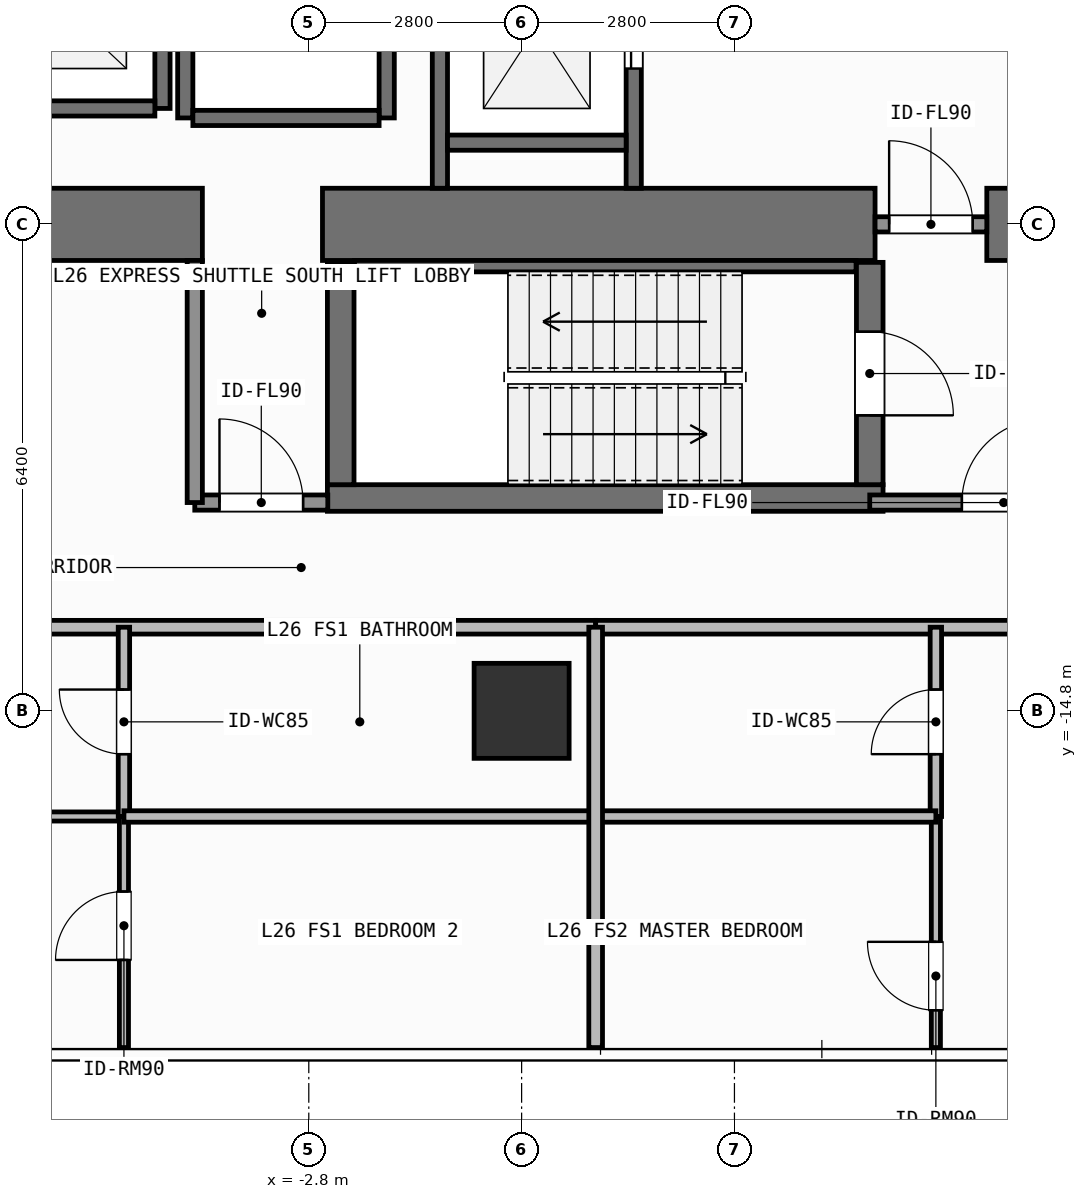
"""IFC4 building model, lengths in metres.
Left out: names, types, materials, properties, quantities, classifications, styles, units other than length and angle.
Written with IfcOpenShell. Run it as: python <this file> out.ifc"""

import sys

from ifc_helpers import new_model, si_unit, direction, frame, frame_2d, origin, origin_2d, place, context, subcontext, project, spatial, rectangle, extrude, element, fill, save


model = new_model("IFC4")
c1 = context("Model", 3, precision=1e-05, world=origin(), true_north=direction((0.0, 1.0)))
c2 = subcontext(c1, "Body", "Model", "MODEL_VIEW")
j1 = project(units=[si_unit("LENGTHUNIT", "METRE"), si_unit("PLANEANGLEUNIT", "RADIAN")], contexts=[c1])
p1 = place(None, origin())
s1 = spatial("IfcSite", under=j1, at=p1, CompositionType="ELEMENT")
p2 = place(p1, origin())
s2 = spatial("IfcBuilding", under=s1, at=p2, CompositionType="ELEMENT")
p3 = place(p2, frame((0.0, 0.0, 104.7)))
s3 = spatial("IfcBuildingStorey", under=s2, at=p3, CompositionType="ELEMENT", Elevation=104.7)
p4 = place(p3, frame((-7.55, -8.4, 0.0), z_axis=(0.0, 0.0, 1.0), x_axis=(1.0, 0.0, 0.0)))
e1 = element("IfcWall", 1, at=p4, inside=s3, PredefinedType="SHEAR", context=c2, shape_type="SweptSolid", body=[
    extrude(rectangle(XDim=3.35, YDim=0.95, at=frame_2d((1.675, 0.0))), origin(), (0.0, 0.0, 1.0), 3.9),
])
p5 = place(p3, frame((-2.62, -8.4, 0.0), z_axis=(0.0, 0.0, 1.0), x_axis=(1.0, 0.0, 0.0)))
e2 = element("IfcWall", 2, at=p5, inside=s3, PredefinedType="SHEAR", context=c2, shape_type="SweptSolid", body=[
    extrude(rectangle(XDim=7.27, YDim=0.95, at=frame_2d((3.635, 0.0))), origin(), (0.0, 0.0, 1.0), 3.9),
])
p6 = place(p3, frame((6.12, -8.4, 0.0), z_axis=(0.0, 0.0, 1.0), x_axis=(1.0, 0.0, 0.0)))
e3 = element("IfcWall", 3, at=p6, inside=s3, PredefinedType="SHEAR", context=c2, shape_type="SweptSolid", body=[
    extrude(rectangle(XDim=2.755, YDim=0.95, at=frame_2d((1.377, 0.0))), origin(), (0.0, 0.0, 1.0), 3.9),
])
p7 = place(p3, frame((-2.555, -12.0, 0.0), z_axis=(0.0, 0.0, 1.0), x_axis=(1.0, 0.0, 0.0)))
e4 = element("IfcWall", 4, at=p7, inside=s3, PredefinedType="SHEAR", context=c2, shape_type="SweptSolid", body=[
    extrude(rectangle(XDim=7.31, YDim=0.35, at=frame_2d((3.655, 0.0))), origin(), (0.0, 0.0, 1.0), 3.9),
])
p8 = place(p3, frame((-2.2, -8.95, 0.0), z_axis=(0.0, 0.0, 1.0), x_axis=(1.0, 0.0, 0.0)))
e5 = element("IfcWall", 5, at=p8, inside=s3, PredefinedType="SHEAR", context=c2, shape_type="SweptSolid", body=[
    extrude(rectangle(XDim=6.6, YDim=0.15, at=frame_2d((3.3, 0.0))), origin(), (0.0, 0.0, 1.0), 3.9),
])
p9 = place(p3, frame((-2.38, -11.825, 0.0), z_axis=(0.0, 0.0, 1.0), x_axis=(0.0, 1.0, 0.0)))
e6 = element("IfcWall", 6, at=p9, inside=s3, PredefinedType="SHEAR", context=c2, shape_type="SweptSolid", body=[
    extrude(rectangle(XDim=2.925, YDim=0.35, at=frame_2d((1.462, 0.0))), origin(), (0.0, 0.0, 1.0), 3.9),
])
p10 = place(p3, frame((4.58, -8.9, 0.0), z_axis=(0.0, 0.0, 1.0), x_axis=(0.0, -1.0, 0.0)))
e7 = element("IfcWall", 7, at=p10, inside=s3, PredefinedType="SHEAR", context=c2, shape_type="SweptSolid", body=[
    extrude(rectangle(XDim=2.925, YDim=0.35, at=frame_2d((1.462, 0.0))), origin(), (0.0, 0.0, 1.0), 3.9),
])
p11 = place(p10, frame((0.913, 0.0, 0.0)))
e8 = element("IfcOpeningElement", 8, at=p11, cuts=e7, PredefinedType="OPENING", context=c2, shape_type="SweptSolid", body=[
    extrude(rectangle(XDim=1.1, YDim=2.15, at=frame_2d((0.55, 1.075))), frame((0.0, 0.185, 0.0), z_axis=(0.0, -1.0, 0.0), x_axis=(1.0, 0.0, 0.0)), (0.0, 0.0, 1.0), 0.37),
])
p12 = place(p3, frame((0.0, -14.8, 0.0), z_axis=(0.0, 0.0, 1.0), x_axis=(1.0, 0.0, 0.0)))
e9 = element("IfcColumn", 9, at=p12, inside=s3, PredefinedType="COLUMN", context=c2, shape_type="SweptSolid", body=[
    extrude(rectangle(XDim=1.25, YDim=1.25, at=origin_2d()), origin(), (0.0, 0.0, 1.0), 3.9),
])
p13 = place(p3, frame((-4.725, -6.875, 0.0), z_axis=(0.0, 0.0, 1.0), x_axis=(0.0, 1.0, 0.0)))
e10 = element("IfcWall", 10, at=p13, inside=s3, PredefinedType="SHEAR", context=c2, shape_type="SweptSolid", body=[
    extrude(rectangle(XDim=2.55, YDim=0.2, at=frame_2d((1.275, 0.0))), origin(), (0.0, 0.0, 1.0), 3.62),
])
p14 = place(p3, frame((-7.175, -6.875, 0.0), z_axis=(0.0, 0.0, 1.0), x_axis=(1.0, 0.0, 0.0)))
e11 = element("IfcWall", 11, at=p14, inside=s3, PredefinedType="SHEAR", context=c2, shape_type="SweptSolid", body=[
    extrude(rectangle(XDim=2.35, YDim=0.2, at=frame_2d((1.175, 0.0))), origin(), (0.0, 0.0, 1.0), 3.62),
])
for number, where, z_axis, x_axis in (
    (12, (-4.425, -7.0, 0.0), (0.0, 0.0, 1.0), (0.0, 1.0, 0.0)),
    (13, (-1.775, -7.0, 0.0), (0.0, 0.0, 1.0), (0.0, 1.0, 0.0)),
):
    element("IfcWall", number, at=place(p3, frame(where, z_axis=z_axis, x_axis=x_axis)), inside=s3, PredefinedType="SHEAR", context=c2, shape_type="SweptSolid", body=[
        extrude(rectangle(XDim=2.8, YDim=0.2, at=frame_2d((1.4, 0.0))), origin(), (0.0, 0.0, 1.0), 3.62),
    ])
p15 = place(p3, frame((-4.325, -7.0, 0.0), z_axis=(0.0, 0.0, 1.0), x_axis=(1.0, 0.0, 0.0)))
e14 = element("IfcWall", 14, at=p15, inside=s3, PredefinedType="SHEAR", context=c2, shape_type="SweptSolid", body=[
    extrude(rectangle(XDim=2.45, YDim=0.2, at=frame_2d((1.225, 0.0))), origin(), (0.0, 0.0, 1.0), 3.62),
])
p16 = place(p3, frame((-1.075, -7.925, 0.0), z_axis=(0.0, 0.0, 1.0), x_axis=(0.0, 1.0, 0.0)))
e15 = element("IfcWall", 15, at=p16, inside=s3, PredefinedType="SHEAR", context=c2, shape_type="SweptSolid", body=[
    extrude(rectangle(XDim=3.65, YDim=0.2, at=frame_2d((1.825, 0.0))), origin(), (0.0, 0.0, 1.0), 3.62),
])
p17 = place(p3, frame((1.475, -7.925, 0.0), z_axis=(0.0, 0.0, 1.0), x_axis=(0.0, 1.0, 0.0)))
e16 = element("IfcWall", 16, at=p17, inside=s3, PredefinedType="SHEAR", context=c2, shape_type="SweptSolid", body=[
    extrude(rectangle(XDim=3.65, YDim=0.2, at=frame_2d((1.825, 0.0))), origin(), (0.0, 0.0, 1.0), 3.62),
])
p18 = place(p17, frame((1.575, 0.0, 0.0)))
e17 = element("IfcOpeningElement", 17, at=p18, cuts=e16, PredefinedType="OPENING", context=c2, shape_type="SweptSolid", body=[
    extrude(rectangle(XDim=1.1, YDim=2.2, at=frame_2d((0.55, 1.1))), frame((0.0, 0.11, 0.0), z_axis=(0.0, -1.0, 0.0), x_axis=(1.0, 0.0, 0.0)), (0.0, 0.0, 1.0), 0.22),
])
p19 = place(p3, frame((-0.975, -7.325, 0.0), z_axis=(0.0, 0.0, 1.0), x_axis=(1.0, 0.0, 0.0)))
e18 = element("IfcWall", 18, at=p19, inside=s3, PredefinedType="SHEAR", context=c2, shape_type="SweptSolid", body=[
    extrude(rectangle(XDim=2.35, YDim=0.2, at=frame_2d((1.175, 0.0))), origin(), (0.0, 0.0, 1.0), 3.62),
])
p20 = place(p3, frame((4.58, -12.06, 0.0), z_axis=(0.0, 0.0, 1.0), x_axis=(1.0, 0.0, 0.0)))
e19 = element("IfcWall", 19, at=p20, inside=s3, PredefinedType="SOLIDWALL", context=c2, shape_type="SweptSolid", body=[
    extrude(rectangle(XDim=3.7, YDim=0.2, at=frame_2d((1.85, 0.0))), origin(), (0.0, 0.0, 1.0), 3.62),
])
p21 = place(p20, frame((1.212, 0.0, 0.0)))
e20 = element("IfcOpeningElement", 20, at=p21, cuts=e19, PredefinedType="OPENING", context=c2, shape_type="SweptSolid", body=[
    extrude(rectangle(XDim=1.1, YDim=2.15, at=frame_2d((0.55, 1.075))), frame((0.0, 0.11, 0.0), z_axis=(0.0, -1.0, 0.0), x_axis=(1.0, 0.0, 0.0)), (0.0, 0.0, 1.0), 0.22),
])
p22 = place(p3, frame((4.65, -8.4, 0.0), z_axis=(0.0, 0.0, 1.0), x_axis=(1.0, 0.0, 0.0)))
e21 = element("IfcWall", 21, at=p22, inside=s3, PredefinedType="SOLIDWALL", context=c2, shape_type="SweptSolid", body=[
    extrude(rectangle(XDim=1.47, YDim=0.2, at=frame_2d((0.735, 0.0))), origin(), (0.0, 0.0, 1.0), 2.66),
])
p23 = place(p22, frame((0.185, 0.0, 0.0)))
e22 = element("IfcOpeningElement", 22, at=p23, cuts=e21, PredefinedType="OPENING", context=c2, shape_type="SweptSolid", body=[
    extrude(rectangle(XDim=1.1, YDim=2.15, at=frame_2d((0.55, 1.075))), frame((0.0, 0.11, 0.0), z_axis=(0.0, -1.0, 0.0), x_axis=(1.0, 0.0, 0.0)), (0.0, 0.0, 1.0), 0.22),
])
p24 = place(p3, frame((-4.3, -12.06, 0.0), z_axis=(0.0, 0.0, 1.0), x_axis=(1.0, 0.0, 0.0)))
e23 = element("IfcWall", 23, at=p24, inside=s3, PredefinedType="SOLIDWALL", context=c2, shape_type="SweptSolid", body=[
    extrude(rectangle(XDim=1.75, YDim=0.2, at=frame_2d((0.875, 0.0))), origin(), (0.0, 0.0, 1.0), 3.62),
])
p25 = place(p24, frame((0.325, 0.0, 0.0)))
e24 = element("IfcOpeningElement", 24, at=p25, cuts=e23, PredefinedType="OPENING", context=c2, shape_type="SweptSolid", body=[
    extrude(rectangle(XDim=1.1, YDim=2.15, at=frame_2d((0.55, 1.075))), frame((0.0, 0.11, 0.0), z_axis=(0.0, -1.0, 0.0), x_axis=(1.0, 0.0, 0.0)), (0.0, 0.0, 1.0), 0.22),
])
p26 = place(p3, frame((-24.42, -13.7, 0.0), z_axis=(0.0, 0.0, 1.0), x_axis=(1.0, 0.0, 0.0)))
e25 = element("IfcWall", 25, at=p26, inside=s3, PredefinedType="PARTITIONING", context=c2, shape_type="SweptSolid", body=[
    extrude(rectangle(XDim=25.394, YDim=0.18, at=frame_2d((12.697, 0.0))), origin(), (0.0, 0.0, 1.0), 3.62),
])
p27 = place(p26, frame((10.939, 0.0, 0.0)))
e26 = element("IfcOpeningElement", 26, at=p27, cuts=e25, PredefinedType="OPENING", context=c2, shape_type="SweptSolid", body=[
    extrude(rectangle(XDim=1.0, YDim=2.2, at=frame_2d((0.5, 1.1))), frame((0.0, 0.1, 0.0), z_axis=(0.0, -1.0, 0.0), x_axis=(1.0, 0.0, 0.0)), (0.0, 0.0, 1.0), 0.2),
])
p28 = place(p3, frame((-20.725, -16.19, 0.0), z_axis=(0.0, 0.0, 1.0), x_axis=(1.0, 0.0, 0.0)))
e27 = element("IfcWall", 27, at=p28, inside=s3, PredefinedType="PARTITIONING", context=c2, shape_type="SweptSolid", body=[
    extrude(rectangle(XDim=15.493, YDim=0.12, at=frame_2d((7.747, 0.0))), origin(), (0.0, 0.0, 1.0), 3.62),
])
p29 = place(p28, frame((7.296, 0.0, 0.0)))
e28 = element("IfcOpeningElement", 28, at=p29, cuts=e27, PredefinedType="OPENING", context=c2, shape_type="SweptSolid", body=[
    extrude(rectangle(XDim=0.9, YDim=2.1, at=frame_2d((0.45, 1.05))), frame((0.0, 0.07, 0.0), z_axis=(0.0, -1.0, 0.0), x_axis=(1.0, 0.0, 0.0)), (0.0, 0.0, 1.0), 0.14),
])
p30 = place(p3, frame((-5.232, -16.19, 0.0), z_axis=(0.0, 0.0, 1.0), x_axis=(0.0, 1.0, 0.0)))
e29 = element("IfcWall", 29, at=p30, inside=s3, PredefinedType="PARTITIONING", context=c2, shape_type="SweptSolid", body=[
    extrude(rectangle(XDim=2.49, YDim=0.15, at=frame_2d((1.245, 0.0))), origin(), (0.0, 0.0, 1.0), 3.62),
])
p31 = place(p30, frame((0.82, 0.0, 0.0)))
e30 = element("IfcOpeningElement", 30, at=p31, cuts=e29, PredefinedType="OPENING", context=c2, shape_type="SweptSolid", body=[
    extrude(rectangle(XDim=0.85, YDim=2.1, at=frame_2d((0.425, 1.05))), frame((0.0, 0.085, 0.0), z_axis=(0.0, -1.0, 0.0), x_axis=(1.0, 0.0, 0.0)), (0.0, 0.0, 1.0), 0.17),
])
p32 = place(p3, frame((-5.232, -19.23, 0.0), z_axis=(0.0, 0.0, 1.0), x_axis=(0.0, 1.0, 0.0)))
e31 = element("IfcWall", 31, at=p32, inside=s3, PredefinedType="PARTITIONING", context=c2, shape_type="SweptSolid", body=[
    extrude(rectangle(XDim=3.04, YDim=0.12, at=frame_2d((1.52, 0.0))), origin(), (0.0, 0.0, 1.0), 3.62),
])
p33 = place(p32, frame((1.153, 0.0, 0.0)))
e32 = element("IfcOpeningElement", 32, at=p33, cuts=e31, PredefinedType="OPENING", context=c2, shape_type="SweptSolid", body=[
    extrude(rectangle(XDim=0.9, YDim=2.1, at=frame_2d((0.45, 1.05))), frame((0.0, 0.07, 0.0), z_axis=(0.0, -1.0, 0.0), x_axis=(1.0, 0.0, 0.0)), (0.0, 0.0, 1.0), 0.14),
])
p34 = place(p3, frame((0.974, -13.7, 0.0), z_axis=(0.0, 0.0, 1.0), x_axis=(1.0, 0.0, 0.0)))
e33 = element("IfcWall", 33, at=p34, inside=s3, PredefinedType="PARTITIONING", context=c2, shape_type="SweptSolid", body=[
    extrude(rectangle(XDim=17.646, YDim=0.18, at=frame_2d((8.823, 0.0))), origin(), (0.0, 0.0, 1.0), 3.62),
])
p35 = place(p34, frame((7.695, 0.0, 0.0)))
e34 = element("IfcOpeningElement", 34, at=p35, cuts=e33, PredefinedType="OPENING", context=c2, shape_type="SweptSolid", body=[
    extrude(rectangle(XDim=1.0, YDim=2.2, at=frame_2d((0.5, 1.1))), frame((0.0, 0.1, 0.0), z_axis=(0.0, -1.0, 0.0), x_axis=(1.0, 0.0, 0.0)), (0.0, 0.0, 1.0), 0.2),
])
p36 = place(p3, frame((5.45, -16.19, 0.0), z_axis=(0.0, 0.0, 1.0), x_axis=(0.0, 1.0, 0.0)))
e35 = element("IfcWall", 35, at=p36, inside=s3, PredefinedType="PARTITIONING", context=c2, shape_type="SweptSolid", body=[
    extrude(rectangle(XDim=2.49, YDim=0.15, at=frame_2d((1.245, 0.0))), origin(), (0.0, 0.0, 1.0), 3.62),
])
p37 = place(p36, frame((0.82, 0.0, 0.0)))
e36 = element("IfcOpeningElement", 36, at=p37, cuts=e35, PredefinedType="OPENING", context=c2, shape_type="SweptSolid", body=[
    extrude(rectangle(XDim=0.85, YDim=2.1, at=frame_2d((0.425, 1.05))), frame((0.0, 0.085, 0.0), z_axis=(0.0, -1.0, 0.0), x_axis=(1.0, 0.0, 0.0)), (0.0, 0.0, 1.0), 0.17),
])
p38 = place(p3, frame((5.45, -19.23, 0.0), z_axis=(0.0, 0.0, 1.0), x_axis=(0.0, 1.0, 0.0)))
e37 = element("IfcWall", 37, at=p38, inside=s3, PredefinedType="PARTITIONING", context=c2, shape_type="SweptSolid", body=[
    extrude(rectangle(XDim=3.04, YDim=0.12, at=frame_2d((1.52, 0.0))), origin(), (0.0, 0.0, 1.0), 3.62),
])
p39 = place(p38, frame((0.491, 0.0, 0.0)))
e38 = element("IfcOpeningElement", 38, at=p39, cuts=e37, PredefinedType="OPENING", context=c2, shape_type="SweptSolid", body=[
    extrude(rectangle(XDim=0.9, YDim=2.1, at=frame_2d((0.45, 1.05))), frame((0.0, 0.07, 0.0), z_axis=(0.0, -1.0, 0.0), x_axis=(1.0, 0.0, 0.0)), (0.0, 0.0, 1.0), 0.14),
])
p40 = place(p3, frame((-4.3, -12.06, 0.0), z_axis=(0.0, 0.0, 1.0), x_axis=(0.0, 1.0, 0.0)))
e39 = element("IfcWall", 39, at=p40, inside=s3, PredefinedType="SOLIDWALL", context=c2, shape_type="SweptSolid", body=[
    extrude(rectangle(XDim=3.185, YDim=0.2, at=frame_2d((1.593, 0.0))), origin(), (0.0, 0.0, 1.0), 3.62),
])
p41 = place(p3, frame((-5.232, -16.19, 0.0), z_axis=(0.0, 0.0, 1.0), x_axis=(1.0, 0.0, 0.0)))
e40 = element("IfcWall", 40, at=p41, inside=s3, PredefinedType="PARTITIONING", context=c2, shape_type="SweptSolid", body=[
    extrude(rectangle(XDim=6.206, YDim=0.15, at=frame_2d((3.103, 0.0))), origin(), (0.0, 0.0, 1.0), 3.62),
])
p42 = place(p3, frame((0.974, -16.19, 0.0), z_axis=(0.0, 0.0, 1.0), x_axis=(1.0, 0.0, 0.0)))
e41 = element("IfcWall", 41, at=p42, inside=s3, PredefinedType="PARTITIONING", context=c2, shape_type="SweptSolid", body=[
    extrude(rectangle(XDim=4.476, YDim=0.15, at=frame_2d((2.238, 0.0))), origin(), (0.0, 0.0, 1.0), 3.62),
])
p43 = place(p3, frame((0.974, -19.23, 0.0), z_axis=(0.0, 0.0, 1.0), x_axis=(0.0, 1.0, 0.0)))
e42 = element("IfcWall", 42, at=p43, inside=s3, PredefinedType="PARTITIONING", context=c2, shape_type="SweptSolid", body=[
    extrude(rectangle(XDim=5.53, YDim=0.18, at=frame_2d((2.765, 0.0))), origin(), (0.0, 0.0, 1.0), 3.62),
])
p44 = place(p18, origin())
e43 = element("IfcDoor", 43, at=p44, inside=s3, OperationType="SLIDING_TO_LEFT", PredefinedType="DOOR", context=c2, shape_type="SweptSolid", body=[
    extrude(rectangle(XDim=1.1, YDim=2.2, at=frame_2d((0.55, 1.1))), frame((0.0, 0.025, 0.0), z_axis=(0.0, -1.0, 0.0), x_axis=(1.0, 0.0, 0.0)), (0.0, 0.0, 1.0), 0.05),
])
fill(e17, e43)
p45 = place(p11, origin())
e44 = element("IfcDoor", 44, at=p45, inside=s3, OperationType="SINGLE_SWING_RIGHT", PredefinedType="DOOR", context=c2, shape_type="SweptSolid", body=[
    extrude(rectangle(XDim=1.1, YDim=2.15, at=frame_2d((0.55, 1.075))), frame((0.0, 0.025, 0.0), z_axis=(0.0, -1.0, 0.0), x_axis=(1.0, 0.0, 0.0)), (0.0, 0.0, 1.0), 0.05),
])
fill(e8, e44)
p46 = place(p21, origin())
e45 = element("IfcDoor", 45, at=p46, inside=s3, OperationType="SINGLE_SWING_RIGHT", PredefinedType="DOOR", context=c2, shape_type="SweptSolid", body=[
    extrude(rectangle(XDim=1.1, YDim=2.15, at=frame_2d((0.55, 1.075))), frame((0.0, 0.025, 0.0), z_axis=(0.0, -1.0, 0.0), x_axis=(1.0, 0.0, 0.0)), (0.0, 0.0, 1.0), 0.05),
])
fill(e20, e45)
p47 = place(p23, origin())
e46 = element("IfcDoor", 46, at=p47, inside=s3, OperationType="SINGLE_SWING_LEFT", PredefinedType="DOOR", context=c2, shape_type="SweptSolid", body=[
    extrude(rectangle(XDim=1.1, YDim=2.15, at=frame_2d((0.55, 1.075))), frame((0.0, 0.025, 0.0), z_axis=(0.0, -1.0, 0.0), x_axis=(1.0, 0.0, 0.0)), (0.0, 0.0, 1.0), 0.05),
])
fill(e22, e46)
p48 = place(p25, origin())
e47 = element("IfcDoor", 47, at=p48, inside=s3, OperationType="SINGLE_SWING_LEFT", PredefinedType="DOOR", context=c2, shape_type="SweptSolid", body=[
    extrude(rectangle(XDim=1.1, YDim=2.15, at=frame_2d((0.55, 1.075))), frame((0.0, 0.025, 0.0), z_axis=(0.0, -1.0, 0.0), x_axis=(1.0, 0.0, 0.0)), (0.0, 0.0, 1.0), 0.05),
])
fill(e24, e47)
p49 = place(p31, origin())
e48 = element("IfcDoor", 48, at=p49, inside=s3, OperationType="SINGLE_SWING_RIGHT", PredefinedType="DOOR", context=c2, shape_type="SweptSolid", body=[
    extrude(rectangle(XDim=0.85, YDim=2.1, at=frame_2d((0.425, 1.05))), frame((0.0, 0.025, 0.0), z_axis=(0.0, -1.0, 0.0), x_axis=(1.0, 0.0, 0.0)), (0.0, 0.0, 1.0), 0.05),
])
fill(e30, e48)
p50 = place(p33, origin())
e49 = element("IfcDoor", 49, at=p50, inside=s3, OperationType="SINGLE_SWING_LEFT", PredefinedType="DOOR", context=c2, shape_type="SweptSolid", body=[
    extrude(rectangle(XDim=0.9, YDim=2.1, at=frame_2d((0.45, 1.05))), frame((0.0, 0.025, 0.0), z_axis=(0.0, -1.0, 0.0), x_axis=(1.0, 0.0, 0.0)), (0.0, 0.0, 1.0), 0.05),
])
fill(e32, e49)
p51 = place(p37, origin())
e50 = element("IfcDoor", 50, at=p51, inside=s3, OperationType="SINGLE_SWING_LEFT", PredefinedType="DOOR", context=c2, shape_type="SweptSolid", body=[
    extrude(rectangle(XDim=0.85, YDim=2.1, at=frame_2d((0.425, 1.05))), frame((0.0, 0.025, 0.0), z_axis=(0.0, -1.0, 0.0), x_axis=(1.0, 0.0, 0.0)), (0.0, 0.0, 1.0), 0.05),
])
fill(e36, e50)
p52 = place(p39, origin())
e51 = element("IfcDoor", 51, at=p52, inside=s3, OperationType="SINGLE_SWING_RIGHT", PredefinedType="DOOR", context=c2, shape_type="SweptSolid", body=[
    extrude(rectangle(XDim=0.9, YDim=2.1, at=frame_2d((0.45, 1.05))), frame((0.0, 0.025, 0.0), z_axis=(0.0, -1.0, 0.0), x_axis=(1.0, 0.0, 0.0)), (0.0, 0.0, 1.0), 0.05),
])
fill(e38, e51)
save(model, sys.argv[1])
